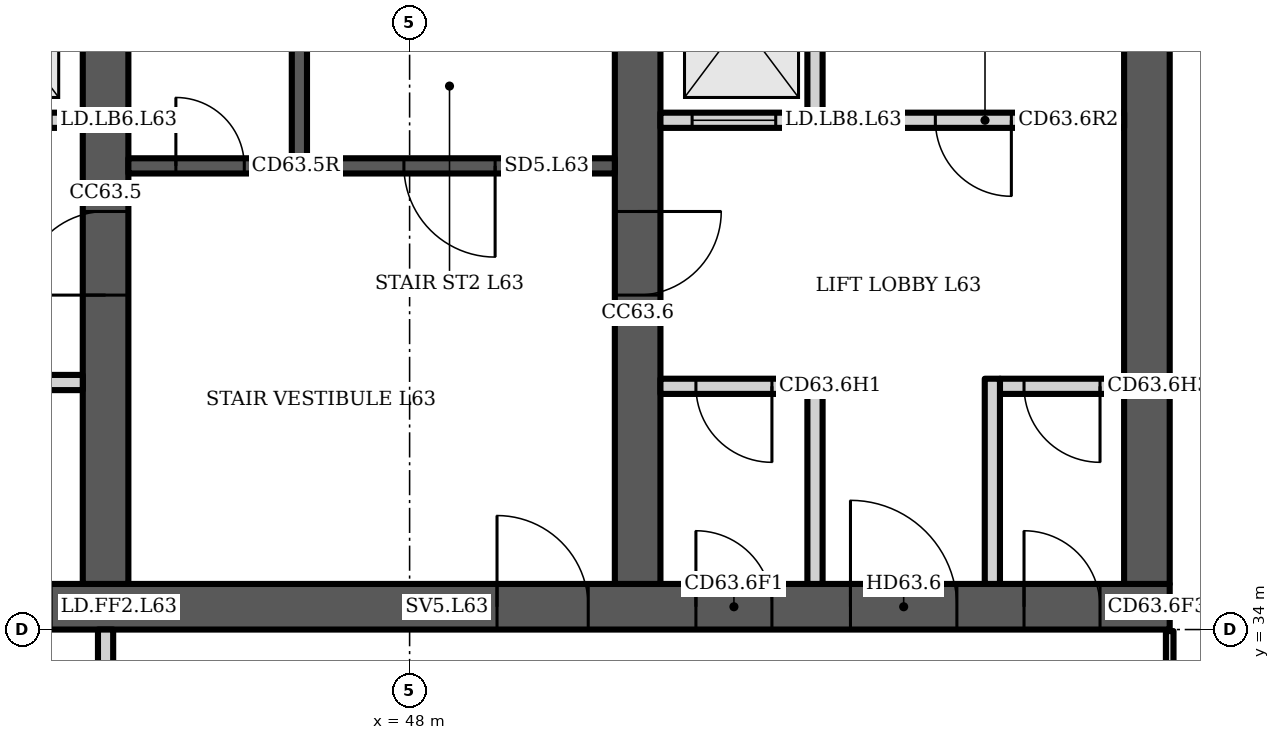
"""IFC4 building model, lengths in metres.
Left out: names, types, materials, properties, quantities, classifications, styles, units other than length and angle.
Written with IfcOpenShell. Run it as: python <this file> out.ifc"""

import sys

from ifc_helpers import new_model, si_unit, direction, frame, frame_2d, origin, place, context, subcontext, project, spatial, polyline, rectangle, outline, extrude, element, fill, save


model = new_model("IFC4")
c1 = context("Model", 3, precision=1e-05, world=origin(), true_north=direction((0.0, 1.0)))
c2 = subcontext(c1, "Body", "Model", "MODEL_VIEW")
j1 = project(units=[si_unit("LENGTHUNIT", "METRE"), si_unit("PLANEANGLEUNIT", "RADIAN")], contexts=[c1])
p1 = place(None, origin())
s1 = spatial("IfcSite", under=j1, at=p1, CompositionType="ELEMENT")
p2 = place(p1, origin())
s2 = spatial("IfcBuilding", under=s1, at=p2, CompositionType="ELEMENT")
p3 = place(p2, frame((0.0, 0.0, 250.3)))
s3 = spatial("IfcBuildingStorey", under=s2, at=p3, CompositionType="ELEMENT", Elevation=250.3)
p4 = place(p3, frame((23.0, 34.3, 0.0), z_axis=(0.0, 0.0, 1.0), x_axis=(1.0, 0.0, 0.0)))
e1 = element("IfcWall", 1, at=p4, inside=s3, PredefinedType="SHEAR", context=c2, shape_type="SweptSolid", body=[
    extrude(rectangle(XDim=35.0, YDim=0.6, at=frame_2d((17.5, 0.0))), origin(), (0.0, 0.0, 1.0), 3.6),
])
p5 = place(p4, frame((0.65, 0.0, 0.0)))
e2 = element("IfcOpeningElement", 2, at=p5, cuts=e1, PredefinedType="OPENING", context=c2, shape_type="SweptSolid", body=[
    extrude(rectangle(XDim=1.2, YDim=2.1, at=frame_2d((0.6, 1.05))), frame((0.0, 0.31, 0.0), z_axis=(0.0, -1.0, 0.0), x_axis=(1.0, 0.0, 0.0)), (0.0, 0.0, 1.0), 0.62),
])
p6 = place(p4, frame((7.717, 0.0, 0.0)))
e3 = element("IfcOpeningElement", 3, at=p6, cuts=e1, PredefinedType="OPENING", context=c2, shape_type="SweptSolid", body=[
    extrude(rectangle(XDim=1.1, YDim=2.1, at=frame_2d((0.55, 1.05))), frame((0.0, 0.31, 0.0), z_axis=(0.0, -1.0, 0.0), x_axis=(1.0, 0.0, 0.0)), (0.0, 0.0, 1.0), 0.62),
])
p7 = place(p4, frame((12.183, 0.0, 0.0)))
e4 = element("IfcOpeningElement", 4, at=p7, cuts=e1, PredefinedType="OPENING", context=c2, shape_type="SweptSolid", body=[
    extrude(rectangle(XDim=1.1, YDim=2.1, at=frame_2d((0.55, 1.05))), frame((0.0, 0.31, 0.0), z_axis=(0.0, -1.0, 0.0), x_axis=(1.0, 0.0, 0.0)), (0.0, 0.0, 1.0), 0.62),
])
p8 = place(p4, frame((9.8, 0.0, 0.0)))
e5 = element("IfcOpeningElement", 5, at=p8, cuts=e1, PredefinedType="OPENING", context=c2, shape_type="SweptSolid", body=[
    extrude(rectangle(XDim=1.4, YDim=2.1, at=frame_2d((0.7, 1.05))), frame((0.0, 0.31, 0.0), z_axis=(0.0, -1.0, 0.0), x_axis=(1.0, 0.0, 0.0)), (0.0, 0.0, 1.0), 0.62),
])
p9 = place(p4, frame((14.717, 0.0, 0.0)))
e6 = element("IfcOpeningElement", 6, at=p9, cuts=e1, PredefinedType="OPENING", context=c2, shape_type="SweptSolid", body=[
    extrude(rectangle(XDim=1.1, YDim=2.1, at=frame_2d((0.55, 1.05))), frame((0.0, 0.31, 0.0), z_axis=(0.0, -1.0, 0.0), x_axis=(1.0, 0.0, 0.0)), (0.0, 0.0, 1.0), 0.62),
])
p10 = place(p4, frame((16.95, 0.0, 0.0)))
e7 = element("IfcOpeningElement", 7, at=p10, cuts=e1, PredefinedType="OPENING", context=c2, shape_type="SweptSolid", body=[
    extrude(rectangle(XDim=1.1, YDim=2.1, at=frame_2d((0.55, 1.05))), frame((0.0, 0.31, 0.0), z_axis=(0.0, -1.0, 0.0), x_axis=(1.0, 0.0, 0.0)), (0.0, 0.0, 1.0), 0.62),
])
p11 = place(p4, frame((19.183, 0.0, 0.0)))
e8 = element("IfcOpeningElement", 8, at=p11, cuts=e1, PredefinedType="OPENING", context=c2, shape_type="SweptSolid", body=[
    extrude(rectangle(XDim=1.1, YDim=2.1, at=frame_2d((0.55, 1.05))), frame((0.0, 0.31, 0.0), z_axis=(0.0, -1.0, 0.0), x_axis=(1.0, 0.0, 0.0)), (0.0, 0.0, 1.0), 0.62),
])
p12 = place(p4, frame((26.15, 0.0, 0.0)))
e9 = element("IfcOpeningElement", 9, at=p12, cuts=e1, PredefinedType="OPENING", context=c2, shape_type="SweptSolid", body=[
    extrude(rectangle(XDim=1.2, YDim=2.1, at=frame_2d((0.6, 1.05))), frame((0.0, 0.31, 0.0), z_axis=(0.0, -1.0, 0.0), x_axis=(1.0, 0.0, 0.0)), (0.0, 0.0, 1.0), 0.62),
])
p13 = place(p4, frame((28.767, 0.0, 0.0)))
e10 = element("IfcOpeningElement", 10, at=p13, cuts=e1, PredefinedType="OPENING", context=c2, shape_type="SweptSolid", body=[
    extrude(rectangle(XDim=1.0, YDim=2.1, at=frame_2d((0.5, 1.05))), frame((0.0, 0.31, 0.0), z_axis=(0.0, -1.0, 0.0), x_axis=(1.0, 0.0, 0.0)), (0.0, 0.0, 1.0), 0.62),
])
p14 = place(p4, frame((33.083, 0.0, 0.0)))
e11 = element("IfcOpeningElement", 11, at=p14, cuts=e1, PredefinedType="OPENING", context=c2, shape_type="SweptSolid", body=[
    extrude(rectangle(XDim=1.0, YDim=2.1, at=frame_2d((0.5, 1.05))), frame((0.0, 0.31, 0.0), z_axis=(0.0, -1.0, 0.0), x_axis=(1.0, 0.0, 0.0)), (0.0, 0.0, 1.0), 0.62),
])
p15 = place(p4, frame((30.8, 0.0, 0.0)))
e12 = element("IfcOpeningElement", 12, at=p15, cuts=e1, PredefinedType="OPENING", context=c2, shape_type="SweptSolid", body=[
    extrude(rectangle(XDim=1.4, YDim=2.1, at=frame_2d((0.7, 1.05))), frame((0.0, 0.31, 0.0), z_axis=(0.0, -1.0, 0.0), x_axis=(1.0, 0.0, 0.0)), (0.0, 0.0, 1.0), 0.62),
])
p16 = place(p3, frame((44.0, 34.6, 0.0), z_axis=(0.0, 0.0, 1.0), x_axis=(0.0, 1.0, 0.0)))
e13 = element("IfcWall", 13, at=p16, inside=s3, PredefinedType="SHEAR", context=c2, shape_type="SweptSolid", body=[
    extrude(rectangle(XDim=14.784, YDim=0.6, at=frame_2d((7.392, 0.0))), origin(), (0.0, 0.0, 1.0), 3.6),
])
p17 = place(p16, frame((11.608, 0.0, 0.0)))
e14 = element("IfcOpeningElement", 14, at=p17, cuts=e13, PredefinedType="OPENING", context=c2, shape_type="SweptSolid", body=[
    extrude(rectangle(XDim=1.0, YDim=2.1, at=frame_2d((0.5, 1.05))), frame((0.0, 0.31, 0.0), z_axis=(0.0, -1.0, 0.0), x_axis=(1.0, 0.0, 0.0)), (0.0, 0.0, 1.0), 0.62),
])
p18 = place(p16, frame((3.8, 0.0, 0.0)))
e15 = element("IfcOpeningElement", 15, at=p18, cuts=e13, PredefinedType="OPENING", context=c2, shape_type="SweptSolid", body=[
    extrude(rectangle(XDim=1.1, YDim=2.1, at=frame_2d((0.55, 1.05))), frame((0.0, 0.31, 0.0), z_axis=(0.0, -1.0, 0.0), x_axis=(1.0, 0.0, 0.0)), (0.0, 0.0, 1.0), 0.62),
])
p19 = place(p3, frame((51.0, 34.6, 0.0), z_axis=(0.0, 0.0, 1.0), x_axis=(0.0, 1.0, 0.0)))
e16 = element("IfcWall", 16, at=p19, inside=s3, PredefinedType="SHEAR", context=c2, shape_type="SweptSolid", body=[
    extrude(rectangle(XDim=14.171, YDim=0.6, at=frame_2d((7.085, 0.0))), origin(), (0.0, 0.0, 1.0), 3.6),
])
p20 = place(p19, frame((3.8, 0.0, 0.0)))
e17 = element("IfcOpeningElement", 17, at=p20, cuts=e16, PredefinedType="OPENING", context=c2, shape_type="SweptSolid", body=[
    extrude(rectangle(XDim=1.1, YDim=2.1, at=frame_2d((0.55, 1.05))), frame((0.0, 0.31, 0.0), z_axis=(0.0, -1.0, 0.0), x_axis=(1.0, 0.0, 0.0)), (0.0, 0.0, 1.0), 0.62),
])
p21 = place(p3, frame((57.7, 34.6, 0.0), z_axis=(0.0, 0.0, 1.0), x_axis=(0.0, 1.0, 0.0)))
e18 = element("IfcWall", 18, at=p21, inside=s3, PredefinedType="SHEAR", context=c2, shape_type="SweptSolid", body=[
    extrude(rectangle(XDim=13.585, YDim=0.6, at=frame_2d((6.792, 0.0))), origin(), (0.0, 0.0, 1.0), 3.6),
])
p22 = place(p3, frame((37.3, 40.7, 0.0), z_axis=(0.0, 0.0, 1.0), x_axis=(1.0, 0.0, 0.0)))
e19 = element("IfcWall", 19, at=p22, inside=s3, PredefinedType="PARTITIONING", context=c2, shape_type="SweptSolid", body=[
    extrude(rectangle(XDim=6.4, YDim=0.2, at=frame_2d((3.2, 0.0))), origin(), (0.0, 0.0, 1.0), 3.2),
])
p23 = place(p22, frame((0.417, 0.0, 0.0)))
e20 = element("IfcOpeningElement", 20, at=p23, cuts=e19, PredefinedType="OPENING", context=c2, shape_type="SweptSolid", body=[
    extrude(rectangle(XDim=1.1, YDim=2.1, at=frame_2d((0.55, 1.05))), frame((0.0, 0.11, 0.0), z_axis=(0.0, -1.0, 0.0), x_axis=(1.0, 0.0, 0.0)), (0.0, 0.0, 1.0), 0.22),
])
p24 = place(p22, frame((2.65, 0.0, 0.0)))
e21 = element("IfcOpeningElement", 21, at=p24, cuts=e19, PredefinedType="OPENING", context=c2, shape_type="SweptSolid", body=[
    extrude(rectangle(XDim=1.1, YDim=2.1, at=frame_2d((0.55, 1.05))), frame((0.0, 0.11, 0.0), z_axis=(0.0, -1.0, 0.0), x_axis=(1.0, 0.0, 0.0)), (0.0, 0.0, 1.0), 0.22),
])
p25 = place(p22, frame((4.883, 0.0, 0.0)))
e22 = element("IfcOpeningElement", 22, at=p25, cuts=e19, PredefinedType="OPENING", context=c2, shape_type="SweptSolid", body=[
    extrude(rectangle(XDim=1.1, YDim=2.1, at=frame_2d((0.55, 1.05))), frame((0.0, 0.11, 0.0), z_axis=(0.0, -1.0, 0.0), x_axis=(1.0, 0.0, 0.0)), (0.0, 0.0, 1.0), 0.22),
])
p26 = place(p3, frame((0.0, 0.0, -0.0)))
e23 = element("IfcWall", 23, at=p26, inside=s3, PredefinedType="PARTITIONING", context=c2, shape_type="SweptSolid", body=[
    extrude(outline(polyline([(41.567, 37.1), (39.433, 37.1), (39.433, 34.6), (39.233, 34.6), (39.233, 37.45), (37.3, 37.45), (37.3, 37.65), (39.233, 37.65), (39.433, 37.65), (39.433, 37.3), (41.567, 37.3), (41.567, 37.35), (41.767, 37.35), (43.7, 37.35), (43.7, 37.15), (41.767, 37.15), (41.767, 34.6), (41.567, 34.6), (41.567, 37.1)])), origin(), (0.0, 0.0, 1.0), 3.2),
])
p27 = place(p3, frame((0.0, 0.0, -0.0)))
e24 = element("IfcWall", 24, at=p27, inside=s3, PredefinedType="PARTITIONING", context=c2, shape_type="SweptSolid", body=[
    extrude(outline(polyline([(39.433, 40.8), (39.233, 40.8), (39.233, 43.8), (37.3, 43.8), (37.3, 44.0), (43.7, 44.0), (43.7, 43.8), (41.767, 43.8), (41.767, 40.8), (41.567, 40.8), (41.567, 43.8), (39.433, 43.8), (39.433, 40.8)])), origin(), (0.0, 0.0, 1.0), 3.2),
])
p28 = place(p3, frame((44.3, 40.1, 0.0), z_axis=(0.0, 0.0, 1.0), x_axis=(1.0, 0.0, 0.0)))
e25 = element("IfcWall", 25, at=p28, inside=s3, PredefinedType="SHEAR", context=c2, shape_type="SweptSolid", body=[
    extrude(rectangle(XDim=6.4, YDim=0.2, at=frame_2d((3.2, 0.0))), origin(), (0.0, 0.0, 1.0), 3.2),
])
p29 = place(p28, frame((3.625, 0.0, 0.0)))
e26 = element("IfcOpeningElement", 26, at=p29, cuts=e25, PredefinedType="OPENING", context=c2, shape_type="SweptSolid", body=[
    extrude(rectangle(XDim=1.2, YDim=2.1, at=frame_2d((0.6, 1.05))), frame((0.0, 0.11, 0.0), z_axis=(0.0, -1.0, 0.0), x_axis=(1.0, 0.0, 0.0)), (0.0, 0.0, 1.0), 0.22),
])
p30 = place(p28, frame((0.625, 0.0, 0.0)))
e27 = element("IfcOpeningElement", 27, at=p30, cuts=e25, PredefinedType="OPENING", context=c2, shape_type="SweptSolid", body=[
    extrude(rectangle(XDim=0.9, YDim=2.1, at=frame_2d((0.45, 1.05))), frame((0.0, 0.11, 0.0), z_axis=(0.0, -1.0, 0.0), x_axis=(1.0, 0.0, 0.0)), (0.0, 0.0, 1.0), 0.22),
])
p31 = place(p3, frame((46.55, 40.2, 0.0), z_axis=(0.0, 0.0, 1.0), x_axis=(0.0, 1.0, 0.0)))
e28 = element("IfcWall", 28, at=p31, inside=s3, PredefinedType="SHEAR", context=c2, shape_type="SweptSolid", body=[
    extrude(rectangle(XDim=7.2, YDim=0.2, at=frame_2d((3.6, 0.0))), origin(), (0.0, 0.0, 1.0), 3.2),
])
p32 = place(p3, frame((51.3, 37.2, 0.0), z_axis=(0.0, 0.0, 1.0), x_axis=(1.0, 0.0, 0.0)))
e29 = element("IfcWall", 29, at=p32, inside=s3, PredefinedType="PARTITIONING", context=c2, shape_type="SweptSolid", body=[
    extrude(rectangle(XDim=1.933, YDim=0.2, at=frame_2d((0.967, 0.0))), origin(), (0.0, 0.0, 1.0), 3.2),
])
p33 = place(p32, frame((0.467, 0.0, 0.0)))
e30 = element("IfcOpeningElement", 30, at=p33, cuts=e29, PredefinedType="OPENING", context=c2, shape_type="SweptSolid", body=[
    extrude(rectangle(XDim=1.0, YDim=2.1, at=frame_2d((0.5, 1.05))), frame((0.0, 0.11, 0.0), z_axis=(0.0, -1.0, 0.0), x_axis=(1.0, 0.0, 0.0)), (0.0, 0.0, 1.0), 0.22),
])
p34 = place(p3, frame((55.767, 37.2, 0.0), z_axis=(0.0, 0.0, 1.0), x_axis=(1.0, 0.0, 0.0)))
e31 = element("IfcWall", 31, at=p34, inside=s3, PredefinedType="PARTITIONING", context=c2, shape_type="SweptSolid", body=[
    extrude(rectangle(XDim=1.633, YDim=0.2, at=frame_2d((0.817, 0.0))), origin(), (0.0, 0.0, 1.0), 3.2),
])
p35 = place(p34, frame((0.317, 0.0, 0.0)))
e32 = element("IfcOpeningElement", 32, at=p35, cuts=e31, PredefinedType="OPENING", context=c2, shape_type="SweptSolid", body=[
    extrude(rectangle(XDim=1.0, YDim=2.1, at=frame_2d((0.5, 1.05))), frame((0.0, 0.11, 0.0), z_axis=(0.0, -1.0, 0.0), x_axis=(1.0, 0.0, 0.0)), (0.0, 0.0, 1.0), 0.22),
])
p36 = place(p3, frame((51.3, 40.7, 0.0), z_axis=(0.0, 0.0, 1.0), x_axis=(1.0, 0.0, 0.0)))
e33 = element("IfcWall", 33, at=p36, inside=s3, PredefinedType="PARTITIONING", context=c2, shape_type="SweptSolid", body=[
    extrude(rectangle(XDim=6.1, YDim=0.2, at=frame_2d((3.05, 0.0))), origin(), (0.0, 0.0, 1.0), 3.2),
])
p37 = place(p36, frame((0.417, 0.0, 0.0)))
e34 = element("IfcOpeningElement", 34, at=p37, cuts=e33, PredefinedType="OPENING", context=c2, shape_type="SweptSolid", body=[
    extrude(rectangle(XDim=1.1, YDim=2.1, at=frame_2d((0.55, 1.05))), frame((0.0, 0.11, 0.0), z_axis=(0.0, -1.0, 0.0), x_axis=(1.0, 0.0, 0.0)), (0.0, 0.0, 1.0), 0.22),
])
p38 = place(p36, frame((3.617, 0.0, 0.0)))
e35 = element("IfcOpeningElement", 35, at=p38, cuts=e33, PredefinedType="OPENING", context=c2, shape_type="SweptSolid", body=[
    extrude(rectangle(XDim=1.0, YDim=2.1, at=frame_2d((0.5, 1.05))), frame((0.0, 0.11, 0.0), z_axis=(0.0, -1.0, 0.0), x_axis=(1.0, 0.0, 0.0)), (0.0, 0.0, 1.0), 0.22),
])
p39 = place(p3, frame((0.0, 0.0, -0.0)))
e36 = element("IfcWall", 36, at=p39, inside=s3, PredefinedType="PARTITIONING", context=c2, shape_type="SweptSolid", body=[
    extrude(outline(polyline([(53.233, 34.6), (53.233, 37.3), (53.433, 37.3), (53.433, 34.6), (53.233, 34.6)])), origin(), (0.0, 0.0, 1.0), 3.2),
])
p40 = place(p3, frame((0.0, 0.0, -0.0)))
e37 = element("IfcWall", 37, at=p40, inside=s3, PredefinedType="PARTITIONING", context=c2, shape_type="SweptSolid", body=[
    extrude(outline(polyline([(55.567, 34.6), (55.567, 37.3), (55.767, 37.3), (55.767, 34.6), (55.567, 34.6)])), origin(), (0.0, 0.0, 1.0), 3.2),
])
p41 = place(p3, frame((0.0, 0.0, -0.0)))
e38 = element("IfcWall", 38, at=p41, inside=s3, PredefinedType="PARTITIONING", context=c2, shape_type="SweptSolid", body=[
    extrude(outline(polyline([(53.433, 40.8), (53.433, 43.8), (53.233, 43.8), (53.233, 40.8), (53.433, 40.8)])), origin(), (0.0, 0.0, 1.0), 3.2),
])
p42 = place(p3, frame((44.0, 30.5, 0.0), z_axis=(0.0, 0.0, 1.0), x_axis=(0.0, 1.0, 0.0)))
e39 = element("IfcWall", 39, at=p42, inside=s3, PredefinedType="PARTITIONING", context=c2, shape_type="SweptSolid", body=[
    extrude(rectangle(XDim=3.5, YDim=0.2, at=frame_2d((1.75, 0.0))), origin(), (0.0, 0.0, 1.0), 3.2),
])
p43 = place(p42, frame((1.2, 0.0, 0.0)))
e40 = element("IfcOpeningElement", 40, at=p43, cuts=e39, PredefinedType="OPENING", context=c2, shape_type="SweptSolid", body=[
    extrude(rectangle(XDim=1.1, YDim=2.1, at=frame_2d((0.55, 1.05))), frame((0.0, 0.11, 0.0), z_axis=(0.0, -1.0, 0.0), x_axis=(1.0, 0.0, 0.0)), (0.0, 0.0, 1.0), 0.22),
])
p44 = place(p3, frame((58.0, 31.4, 0.0), z_axis=(0.0, 0.0, 1.0), x_axis=(0.0, 1.0, 0.0)))
e41 = element("IfcWall", 41, at=p44, inside=s3, PredefinedType="PARTITIONING", context=c2, shape_type="SweptSolid", body=[
    extrude(rectangle(XDim=2.58, YDim=0.1, at=frame_2d((1.29, 0.0))), origin(), (0.0, 0.0, 1.0), 3.2),
])
p45 = place(p29, origin())
e42 = element("IfcDoor", 42, at=p45, inside=s3, OperationType="SINGLE_SWING_RIGHT", PredefinedType="DOOR", context=c2, shape_type="SweptSolid", body=[
    extrude(rectangle(XDim=1.2, YDim=2.1, at=frame_2d((0.6, 1.05))), frame((0.0, 0.025, 0.0), z_axis=(0.0, -1.0, 0.0), x_axis=(1.0, 0.0, 0.0)), (0.0, 0.0, 1.0), 0.05),
])
fill(e26, e42)
p46 = place(p30, origin())
e43 = element("IfcDoor", 43, at=p46, inside=s3, OperationType="SINGLE_SWING_LEFT", PredefinedType="DOOR", context=c2, shape_type="SweptSolid", body=[
    extrude(rectangle(XDim=0.9, YDim=2.1, at=frame_2d((0.45, 1.05))), frame((0.0, 0.025, 0.0), z_axis=(0.0, -1.0, 0.0), x_axis=(1.0, 0.0, 0.0)), (0.0, 0.0, 1.0), 0.05),
])
fill(e27, e43)
p47 = place(p12, origin())
e44 = element("IfcDoor", 44, at=p47, inside=s3, OperationType="SINGLE_SWING_LEFT", PredefinedType="DOOR", context=c2, shape_type="SweptSolid", body=[
    extrude(rectangle(XDim=1.2, YDim=2.1, at=frame_2d((0.6, 1.05))), frame((0.0, 0.025, 0.0), z_axis=(0.0, -1.0, 0.0), x_axis=(1.0, 0.0, 0.0)), (0.0, 0.0, 1.0), 0.05),
])
fill(e9, e44)
p48 = place(p13, origin())
e45 = element("IfcDoor", 45, at=p48, inside=s3, OperationType="SINGLE_SWING_LEFT", PredefinedType="DOOR", context=c2, shape_type="SweptSolid", body=[
    extrude(rectangle(XDim=1.0, YDim=2.1, at=frame_2d((0.5, 1.05))), frame((0.0, 0.025, 0.0), z_axis=(0.0, -1.0, 0.0), x_axis=(1.0, 0.0, 0.0)), (0.0, 0.0, 1.0), 0.05),
])
fill(e10, e45)
p49 = place(p33, origin())
e46 = element("IfcDoor", 46, at=p49, inside=s3, OperationType="SINGLE_SWING_RIGHT", PredefinedType="DOOR", context=c2, shape_type="SweptSolid", body=[
    extrude(rectangle(XDim=1.0, YDim=2.1, at=frame_2d((0.5, 1.05))), frame((0.0, 0.025, 0.0), z_axis=(0.0, -1.0, 0.0), x_axis=(1.0, 0.0, 0.0)), (0.0, 0.0, 1.0), 0.05),
])
fill(e30, e46)
p50 = place(p14, origin())
e47 = element("IfcDoor", 47, at=p50, inside=s3, OperationType="SINGLE_SWING_LEFT", PredefinedType="DOOR", context=c2, shape_type="SweptSolid", body=[
    extrude(rectangle(XDim=1.0, YDim=2.1, at=frame_2d((0.5, 1.05))), frame((0.0, 0.025, 0.0), z_axis=(0.0, -1.0, 0.0), x_axis=(1.0, 0.0, 0.0)), (0.0, 0.0, 1.0), 0.05),
])
fill(e11, e47)
p51 = place(p35, origin())
e48 = element("IfcDoor", 48, at=p51, inside=s3, OperationType="SINGLE_SWING_RIGHT", PredefinedType="DOOR", context=c2, shape_type="SweptSolid", body=[
    extrude(rectangle(XDim=1.0, YDim=2.1, at=frame_2d((0.5, 1.05))), frame((0.0, 0.025, 0.0), z_axis=(0.0, -1.0, 0.0), x_axis=(1.0, 0.0, 0.0)), (0.0, 0.0, 1.0), 0.05),
])
fill(e32, e48)
p52 = place(p15, origin())
e49 = element("IfcDoor", 49, at=p52, inside=s3, OperationType="DOUBLE_DOOR_SINGLE_SWING", PredefinedType="DOOR", context=c2, shape_type="SweptSolid", body=[
    extrude(rectangle(XDim=1.4, YDim=2.1, at=frame_2d((0.7, 1.05))), frame((0.0, 0.025, 0.0), z_axis=(0.0, -1.0, 0.0), x_axis=(1.0, 0.0, 0.0)), (0.0, 0.0, 1.0), 0.05),
])
fill(e12, e49)
p53 = place(p37, origin())
e50 = element("IfcDoor", 50, at=p53, inside=s3, OperationType="DOUBLE_DOOR_SLIDING", PredefinedType="DOOR", context=c2, shape_type="SweptSolid", body=[
    extrude(rectangle(XDim=1.1, YDim=2.1, at=frame_2d((0.55, 1.05))), frame((0.0, 0.025, 0.0), z_axis=(0.0, -1.0, 0.0), x_axis=(1.0, 0.0, 0.0)), (0.0, 0.0, 1.0), 0.05),
])
fill(e34, e50)
p54 = place(p38, origin())
e51 = element("IfcDoor", 51, at=p54, inside=s3, OperationType="SINGLE_SWING_RIGHT", PredefinedType="DOOR", context=c2, shape_type="SweptSolid", body=[
    extrude(rectangle(XDim=1.0, YDim=2.1, at=frame_2d((0.5, 1.05))), frame((0.0, 0.025, 0.0), z_axis=(0.0, -1.0, 0.0), x_axis=(1.0, 0.0, 0.0)), (0.0, 0.0, 1.0), 0.05),
])
fill(e35, e51)
p55 = place(p18, origin())
e52 = element("IfcDoor", 52, at=p55, inside=s3, OperationType="SINGLE_SWING_LEFT", PredefinedType="DOOR", context=c2, shape_type="SweptSolid", body=[
    extrude(rectangle(XDim=1.1, YDim=2.1, at=frame_2d((0.55, 1.05))), frame((0.0, 0.025, 0.0), z_axis=(0.0, -1.0, 0.0), x_axis=(1.0, 0.0, 0.0)), (0.0, 0.0, 1.0), 0.05),
])
fill(e15, e52)
p56 = place(p20, origin())
e53 = element("IfcDoor", 53, at=p56, inside=s3, OperationType="SINGLE_SWING_RIGHT", PredefinedType="DOOR", context=c2, shape_type="SweptSolid", body=[
    extrude(rectangle(XDim=1.1, YDim=2.1, at=frame_2d((0.55, 1.05))), frame((0.0, 0.025, 0.0), z_axis=(0.0, -1.0, 0.0), x_axis=(1.0, 0.0, 0.0)), (0.0, 0.0, 1.0), 0.05),
])
fill(e17, e53)
save(model, sys.argv[1])
